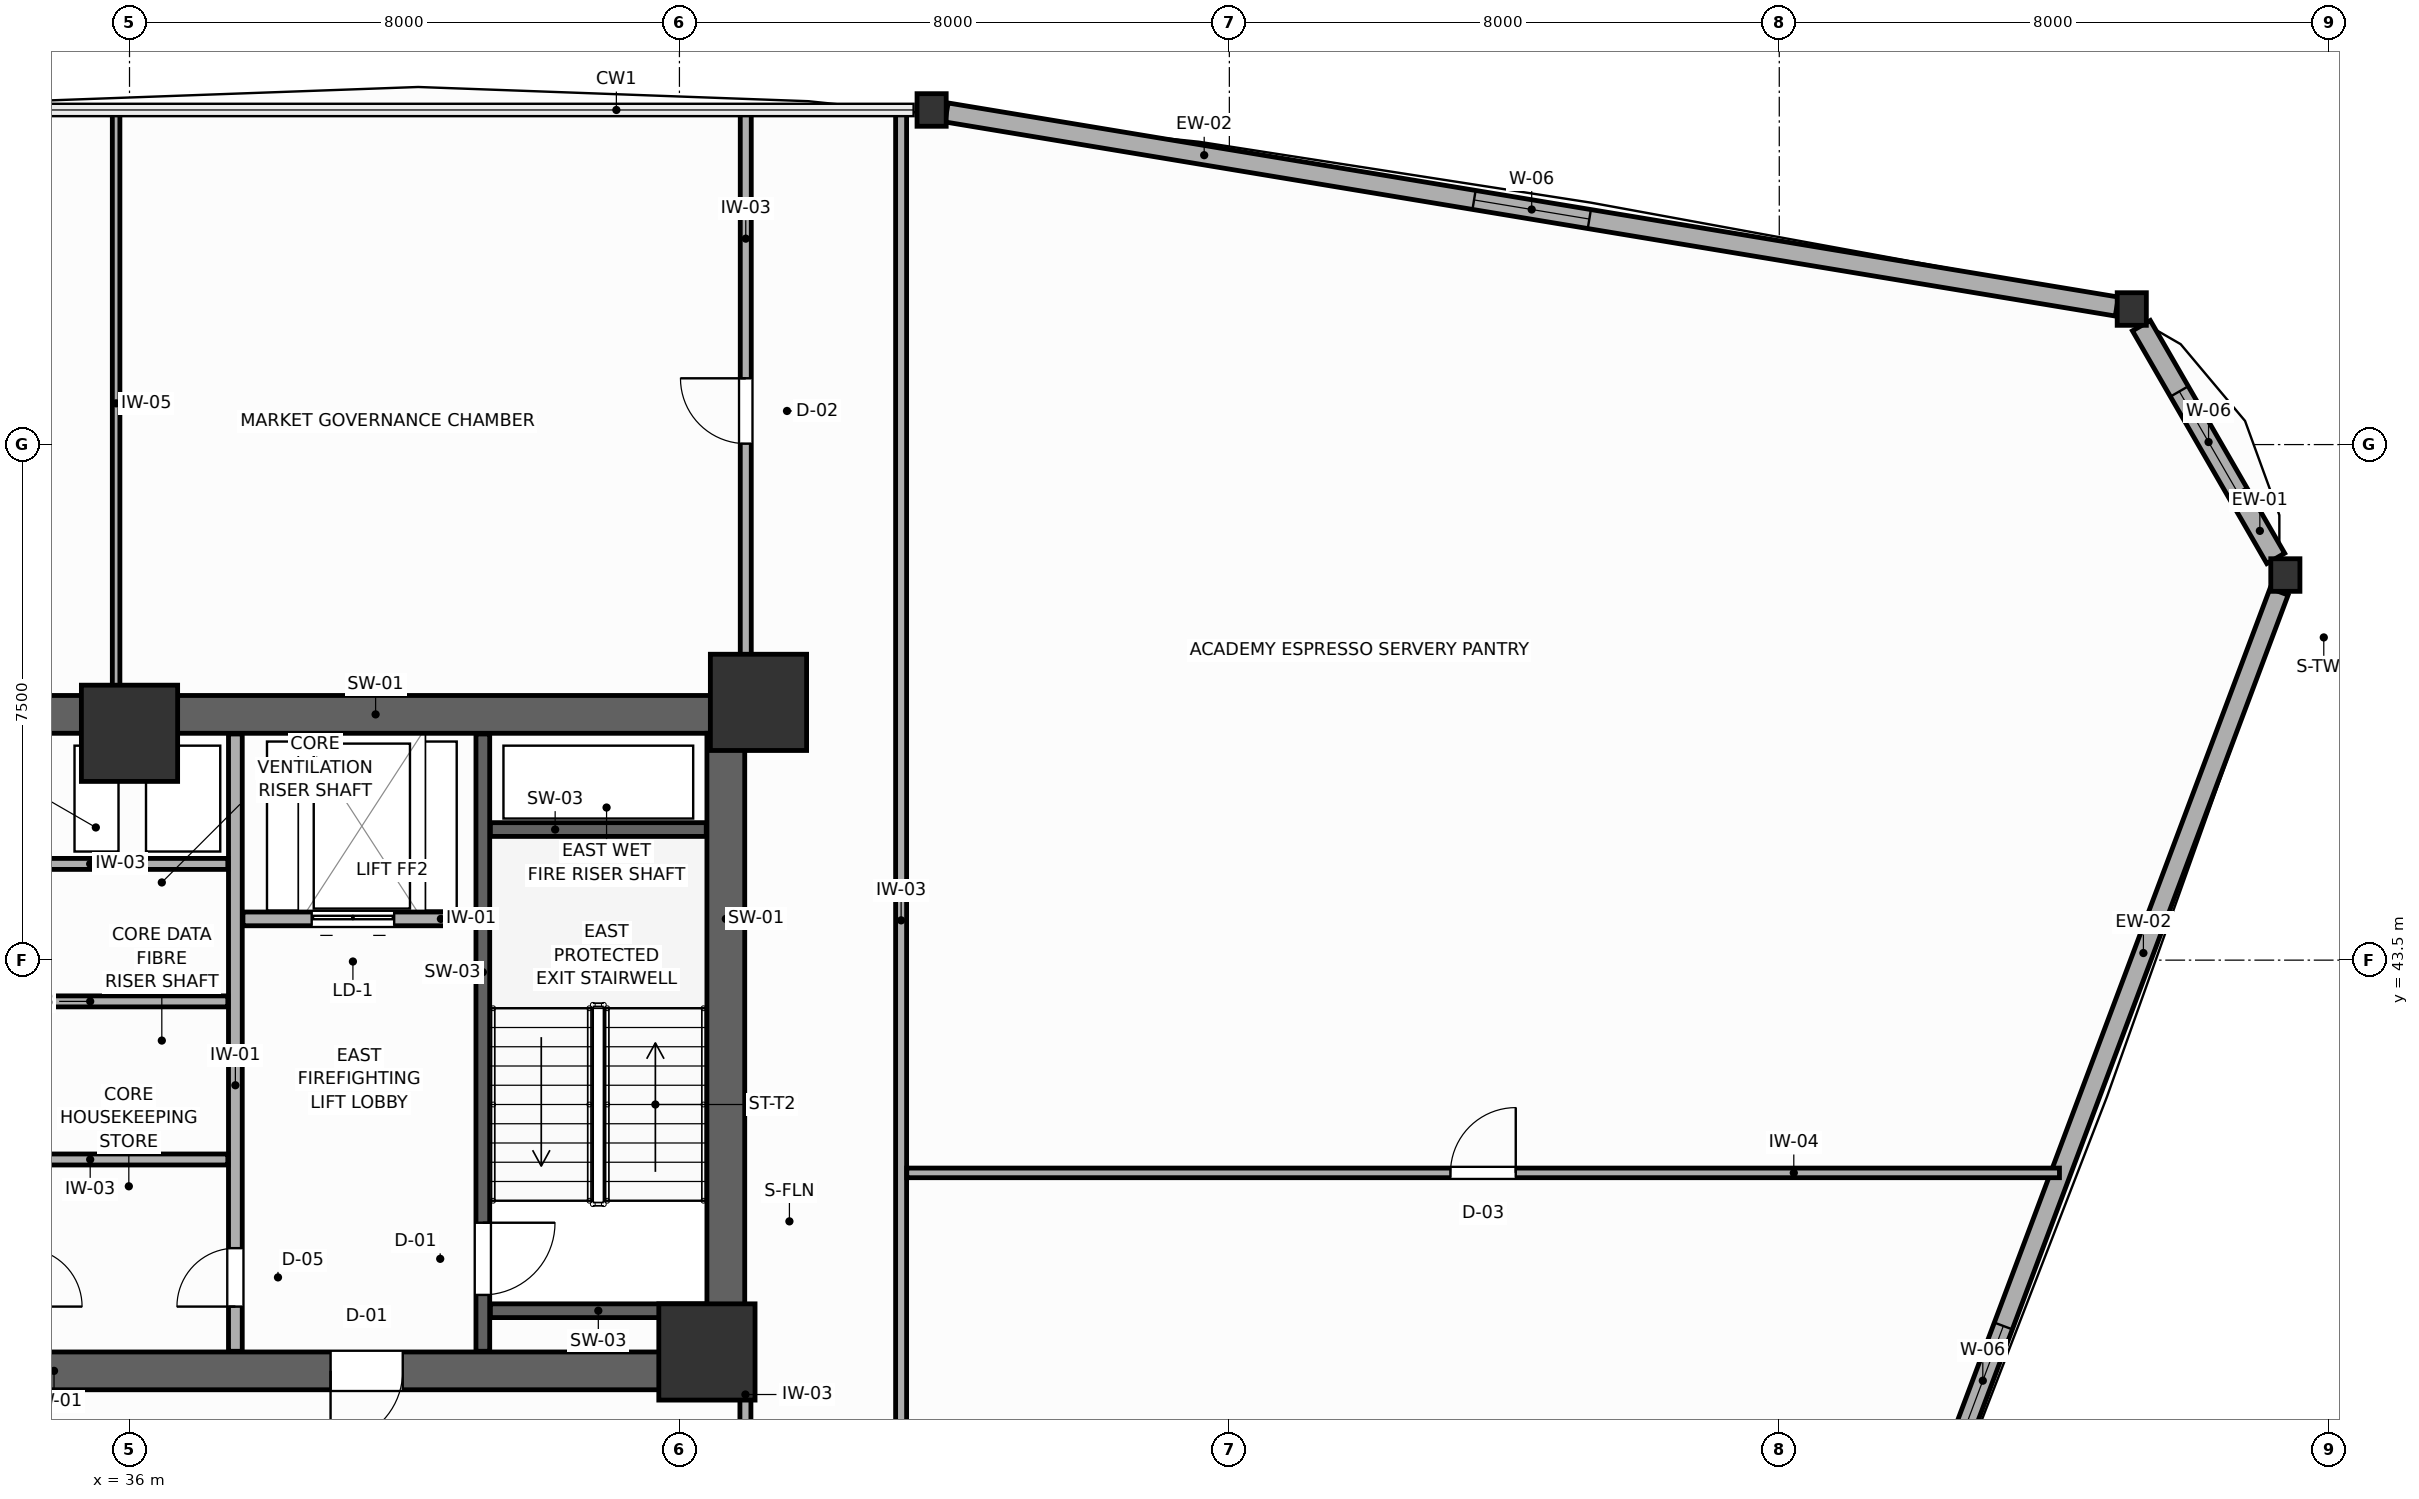
"""IFC4 building model, lengths in metres.
Left out: names, types, materials, properties, quantities, classifications, styles, units other than length and angle.
Written with IfcOpenShell. Run it as: python <this file> out.ifc"""

import sys

from ifc_helpers import new_model, si_unit, direction, frame, frame_2d, origin, origin_2d, place, context, subcontext, project, spatial, rectangle, i_section, extrude, source, transform, mapped, element, fill, save


model = new_model("IFC4")
c1 = context("Model", 3, precision=1e-05, world=origin(), true_north=direction((0.0, 1.0)))
c2 = subcontext(c1, "Body", "Model", "MODEL_VIEW")
j1 = project(units=[si_unit("LENGTHUNIT", "METRE"), si_unit("PLANEANGLEUNIT", "RADIAN")], contexts=[c1])
p1 = place(None, origin())
s1 = spatial("IfcSite", under=j1, at=p1, CompositionType="ELEMENT")
p2 = place(p1, origin())
s2 = spatial("IfcBuilding", under=s1, at=p2, CompositionType="ELEMENT")
p3 = place(p2, frame((0.0, 0.0, 83.4)))
s3 = spatial("IfcBuildingStorey", under=s2, at=p3, CompositionType="ELEMENT", Elevation=83.4)
p4 = place(p3, frame((27.05, 47.075, 0.0), z_axis=(0.0, 0.0, 1.0), x_axis=(1.0, 0.0, 0.0)))
e1 = element("IfcWall", 1, at=p4, inside=s3, PredefinedType="SHEAR", context=c2, shape_type="SweptSolid", body=[
    extrude(rectangle(XDim=17.9, YDim=0.55, at=frame_2d((8.95, 0.0))), origin(), (0.0, 0.0, 1.0), 3.9),
])
p5 = place(p3, frame((27.05, 37.525, 0.0), z_axis=(0.0, 0.0, 1.0), x_axis=(1.0, 0.0, 0.0)))
e2 = element("IfcWall", 2, at=p5, inside=s3, PredefinedType="SHEAR", context=c2, shape_type="SweptSolid", body=[
    extrude(rectangle(XDim=17.9, YDim=0.55, at=frame_2d((8.95, 0.0))), origin(), (0.0, 0.0, 1.0), 3.9),
])
p6 = place(p5, frame((4.975, 0.0, 0.0)))
e3 = element("IfcOpeningElement", 3, at=p6, cuts=e2, PredefinedType="OPENING", context=c2, shape_type="SweptSolid", body=[
    extrude(rectangle(XDim=1.05, YDim=2.1, at=frame_2d((0.525, 1.05))), frame((0.0, 0.285, 0.0), z_axis=(0.0, -1.0, 0.0), x_axis=(1.0, 0.0, 0.0)), (0.0, 0.0, 1.0), 0.57),
])
p7 = place(p5, frame((11.875, 0.0, 0.0)))
e4 = element("IfcOpeningElement", 4, at=p7, cuts=e2, PredefinedType="OPENING", context=c2, shape_type="SweptSolid", body=[
    extrude(rectangle(XDim=1.05, YDim=2.1, at=frame_2d((0.525, 1.05))), frame((0.0, 0.285, 0.0), z_axis=(0.0, -1.0, 0.0), x_axis=(1.0, 0.0, 0.0)), (0.0, 0.0, 1.0), 0.57),
])
p8 = place(p3, frame((44.675, 37.8, 0.0), z_axis=(0.0, 0.0, 1.0), x_axis=(0.0, 1.0, 0.0)))
e5 = element("IfcWall", 5, at=p8, inside=s3, PredefinedType="SHEAR", context=c2, shape_type="SweptSolid", body=[
    extrude(rectangle(XDim=9.0, YDim=0.55, at=frame_2d((4.5, 0.0))), origin(), (0.0, 0.0, 1.0), 3.9),
])
m1 = source(origin(), c2, "Body", "SweptSolid", [
    extrude(rectangle(XDim=1.4, YDim=1.4, at=origin_2d()), origin(), (0.0, 0.0, 1.0), 3.9),
])
for number, where, z_axis, x_axis in (
    (6, (45.15, 47.25, 0.0), (0.0, 0.0, 1.0), (1.0, 0.0, 0.0)),
    (7, (44.4, 37.8, 0.0), (0.0, 0.0, 1.0), (1.0, 0.0, 0.0)),
    (8, (36.0, 46.8, 0.0), (0.0, 0.0, 1.0), (1.0, 0.0, 0.0)),
):
    element("IfcColumn", number, at=place(p3, frame(where, z_axis=z_axis, x_axis=x_axis)), inside=s3, PredefinedType="COLUMN", context=c2, shape_type="MappedRepresentation", body=[
        mapped(m1, transform((0.0, 0.0, 0.0), scale=1.0)),
    ])
m2 = source(origin(), c2, "Body", "SweptSolid", [
    extrude(i_section(OverallWidth=0.424, OverallDepth=0.474, WebThickness=0.045, FlangeThickness=0.072, FilletRadius=0.015, at=origin_2d()), origin(), (0.0, 0.0, 1.0), 3.9),
])
for number, where, z_axis, x_axis in (
    (9, (67.362, 49.102, 0.0), (0.0, 0.0, 1.0), (1.0, 0.0, 0.0)),
    (10, (65.128, 52.972, 0.0), (0.0, 0.0, 1.0), (1.0, 0.0, 0.0)),
    (11, (47.669, 55.868, 0.0), (0.0, 0.0, 1.0), (1.0, 0.0, 0.0)),
):
    element("IfcColumn", number, at=place(p3, frame(where, z_axis=z_axis, x_axis=x_axis)), inside=s3, PredefinedType="COLUMN", context=c2, shape_type="MappedRepresentation", body=[
        mapped(m2, transform((0.0, 0.0, 0.0), scale=1.0)),
    ])
p9 = place(p3, frame((67.222, 49.344, 0.0), z_axis=(0.0, 0.0, 1.0), x_axis=(-0.500014353419, 0.866017116675, 0.0)))
e12 = element("IfcWall", 12, at=p9, inside=s3, PredefinedType="SOLIDWALL", context=c2, shape_type="SweptSolid", body=[
    extrude(rectangle(XDim=3.91, YDim=0.3, at=frame_2d((1.955, 0.0))), origin(), (0.0, 0.0, 1.0), 2.08),
])
p10 = place(p9, frame((1.105, 0.0, 0.75)))
e13 = element("IfcOpeningElement", 13, at=p10, cuts=e12, PredefinedType="OPENING", context=c2, shape_type="SweptSolid", body=[
    extrude(rectangle(XDim=1.7, YDim=1.15, at=frame_2d((0.85, 0.575))), frame((0.0, 0.16, 0.0), z_axis=(0.0, -1.0, 0.0), x_axis=(1.0, 0.0, 0.0)), (0.0, 0.0, 1.0), 0.32),
])
p11 = place(p3, frame((64.911, 53.008, 0.0), z_axis=(0.0, 0.0, 1.0), x_axis=(-0.986523232029, 0.163621247604, 0.0)))
e14 = element("IfcWall", 14, at=p11, inside=s3, PredefinedType="SOLIDWALL", context=c2, shape_type="SweptSolid", body=[
    extrude(rectangle(XDim=17.258, YDim=0.28, at=frame_2d((8.629, 0.0))), origin(), (0.0, 0.0, 1.0), 2.08),
])
p12 = place(p11, frame((7.779, 0.0, 0.75)))
e15 = element("IfcOpeningElement", 15, at=p12, cuts=e14, PredefinedType="OPENING", context=c2, shape_type="SweptSolid", body=[
    extrude(rectangle(XDim=1.7, YDim=1.15, at=frame_2d((0.85, 0.575))), frame((0.0, 0.15, 0.0), z_axis=(0.0, -1.0, 0.0), x_axis=(1.0, 0.0, 0.0)), (0.0, 0.0, 1.0), 0.3),
])
p13 = place(p3, frame((61.231, 32.776, 0.0), z_axis=(0.0, 0.0, 1.0), x_axis=(0.351559441404, 0.936165561832, 0.0)))
e16 = element("IfcWall", 16, at=p13, inside=s3, PredefinedType="SOLIDWALL", context=c2, shape_type="SweptSolid", body=[
    extrude(rectangle(XDim=17.181, YDim=0.28, at=frame_2d((8.59, 0.0))), origin(), (0.0, 0.0, 1.0), 2.08),
])
p14 = place(p13, frame((4.07, 0.0, 0.75)))
e17 = element("IfcOpeningElement", 17, at=p14, cuts=e16, PredefinedType="OPENING", context=c2, shape_type="SweptSolid", body=[
    extrude(rectangle(XDim=1.7, YDim=1.15, at=frame_2d((0.85, 0.575))), frame((0.0, 0.15, 0.0), z_axis=(0.0, -1.0, 0.0), x_axis=(1.0, 0.0, 0.0)), (0.0, 0.0, 1.0), 0.3),
])
p15 = place(p3, frame((41.14, 37.81, 0.0), z_axis=(0.0, 0.0, 1.0), x_axis=(0.0, 1.0, 0.0)))
e18 = element("IfcWall", 18, at=p15, inside=s3, PredefinedType="SHEAR", context=c2, shape_type="SweptSolid", body=[
    extrude(rectangle(XDim=8.98, YDim=0.2, at=frame_2d((4.49, 0.0))), origin(), (0.0, 0.0, 1.0), 3.9),
])
p16 = place(p15, frame((0.82, 0.0, 0.0)))
e19 = element("IfcOpeningElement", 19, at=p16, cuts=e18, PredefinedType="OPENING", context=c2, shape_type="SweptSolid", body=[
    extrude(rectangle(XDim=1.05, YDim=2.1, at=frame_2d((0.525, 1.05))), frame((0.0, 0.11, 0.0), z_axis=(0.0, -1.0, 0.0), x_axis=(1.0, 0.0, 0.0)), (0.0, 0.0, 1.0), 0.22),
])
for number, where, z_axis, x_axis in (
    (20, (41.25, 45.4, 0.0), (0.0, 0.0, 1.0), (1.0, 0.0, 0.0)),
    (21, (41.25, 38.4, 0.0), (0.0, 0.0, 1.0), (1.0, 0.0, 0.0)),
):
    element("IfcWall", number, at=place(p3, frame(where, z_axis=z_axis, x_axis=x_axis)), inside=s3, PredefinedType="SHEAR", context=c2, shape_type="SweptSolid", body=[
        extrude(rectangle(XDim=3.14, YDim=0.2, at=frame_2d((1.57, 0.0))), origin(), (0.0, 0.0, 1.0), 3.9),
    ])
p17 = place(p3, frame((37.65, 44.1, 0.0), z_axis=(0.0, 0.0, 1.0), x_axis=(1.0, 0.0, 0.0)))
e22 = element("IfcWall", 22, at=p17, inside=s3, PredefinedType="PARTITIONING", context=c2, shape_type="SweptSolid", body=[
    extrude(rectangle(XDim=3.38, YDim=0.2, at=frame_2d((1.69, 0.0))), origin(), (0.0, 0.0, 1.0), 3.68),
])
p18 = place(p17, frame((1.0, 0.0, 0.0)))
e23 = element("IfcOpeningElement", 23, at=p18, cuts=e22, PredefinedType="OPENING", context=c2, shape_type="SweptSolid", body=[
    extrude(rectangle(XDim=1.2, YDim=2.1, at=frame_2d((0.6, 1.05))), frame((0.0, 0.11, 0.0), z_axis=(0.0, -1.0, 0.0), x_axis=(1.0, 0.0, 0.0)), (0.0, 0.0, 1.0), 0.22),
])
p19 = place(p3, frame((37.54, 37.81, 0.0), z_axis=(0.0, 0.0, 1.0), x_axis=(0.0, 1.0, 0.0)))
e24 = element("IfcWall", 24, at=p19, inside=s3, PredefinedType="PARTITIONING", context=c2, shape_type="SweptSolid", body=[
    extrude(rectangle(XDim=8.98, YDim=0.2, at=frame_2d((4.49, 0.0))), origin(), (0.0, 0.0, 1.0), 3.68),
])
p20 = place(p19, frame((0.65, 0.0, 0.0)))
e25 = element("IfcOpeningElement", 25, at=p20, cuts=e24, PredefinedType="OPENING", context=c2, shape_type="SweptSolid", body=[
    extrude(rectangle(XDim=0.85, YDim=2.05, at=frame_2d((0.425, 1.025))), frame((0.0, 0.11, 0.0), z_axis=(0.0, -1.0, 0.0), x_axis=(1.0, 0.0, 0.0)), (0.0, 0.0, 1.0), 0.22),
])
for number, where, z_axis, x_axis in (
    (26, (34.57, 40.6, 0.0), (0.0, 0.0, 1.0), (1.0, 0.0, 0.0)),
    (27, (34.57, 42.9, 0.0), (0.0, 0.0, 1.0), (1.0, 0.0, 0.0)),
    (28, (34.57, 44.9, 0.0), (0.0, 0.0, 1.0), (1.0, 0.0, 0.0)),
):
    element("IfcWall", number, at=place(p3, frame(where, z_axis=z_axis, x_axis=x_axis)), inside=s3, PredefinedType="PARTITIONING", context=c2, shape_type="SweptSolid", body=[
        extrude(rectangle(XDim=2.86, YDim=0.16, at=frame_2d((1.43, 0.0))), origin(), (0.0, 0.0, 1.0), 3.68),
    ])
p21 = place(p3, frame((44.96, 35.0, 0.0), z_axis=(0.0, 0.0, 1.0), x_axis=(0.0, 1.0, 0.0)))
e29 = element("IfcWall", 29, at=p21, inside=s3, PredefinedType="PARTITIONING", context=c2, shape_type="SweptSolid", body=[
    extrude(rectangle(XDim=2.65, YDim=0.16, at=frame_2d((1.325, 0.0))), origin(), (0.0, 0.0, 1.0), 3.68),
])
p22 = place(p21, frame((0.75, 0.0, 0.0)))
e30 = element("IfcOpeningElement", 30, at=p22, cuts=e29, PredefinedType="OPENING", context=c2, shape_type="SweptSolid", body=[
    extrude(rectangle(XDim=1.05, YDim=2.1, at=frame_2d((0.525, 1.05))), frame((0.0, 0.09, 0.0), z_axis=(0.0, -1.0, 0.0), x_axis=(1.0, 0.0, 0.0)), (0.0, 0.0, 1.0), 0.18),
])
p23 = place(p3, frame((47.225, 32.31, 0.0), z_axis=(0.0, 0.0, 1.0), x_axis=(0.0, 1.0, 0.0)))
e31 = element("IfcWall", 31, at=p23, inside=s3, PredefinedType="PARTITIONING", context=c2, shape_type="SweptSolid", body=[
    extrude(rectangle(XDim=23.538, YDim=0.16, at=frame_2d((11.769, 0.0))), origin(), (0.0, 0.0, 1.0), 2.24),
])
p24 = place(p3, frame((44.965, 47.34, 0.0), z_axis=(0.0, 0.0, 1.0), x_axis=(0.0, 1.0, 0.0)))
e32 = element("IfcWall", 32, at=p24, inside=s3, PredefinedType="PARTITIONING", context=c2, shape_type="SweptSolid", body=[
    extrude(rectangle(XDim=8.508, YDim=0.16, at=frame_2d((4.254, 0.0))), origin(), (0.0, 0.0, 1.0), 2.24),
])
p25 = place(p24, frame((3.674, 0.0, 0.0)))
e33 = element("IfcOpeningElement", 33, at=p25, cuts=e32, PredefinedType="OPENING", context=c2, shape_type="SweptSolid", body=[
    extrude(rectangle(XDim=0.95, YDim=2.05, at=frame_2d((0.475, 1.025))), frame((0.0, 0.09, 0.0), z_axis=(0.0, -1.0, 0.0), x_axis=(1.0, 0.0, 0.0)), (0.0, 0.0, 1.0), 0.18),
])
p26 = place(p3, frame((47.307, 40.405, 0.0), z_axis=(0.0, 0.0, 1.0), x_axis=(1.0, 0.0, 0.0)))
e34 = element("IfcWall", 34, at=p26, inside=s3, PredefinedType="PARTITIONING", context=c2, shape_type="SweptSolid", body=[
    extrude(rectangle(XDim=16.769, YDim=0.14, at=frame_2d((8.385, 0.0))), origin(), (0.0, 0.0, 1.0), 3.68),
])
p27 = place(p26, frame((7.909, 0.0, 0.0)))
e35 = element("IfcOpeningElement", 35, at=p27, cuts=e34, PredefinedType="OPENING", context=c2, shape_type="SweptSolid", body=[
    extrude(rectangle(XDim=0.95, YDim=2.05, at=frame_2d((0.475, 1.025))), frame((0.0, 0.08, 0.0), z_axis=(0.0, -1.0, 0.0), x_axis=(1.0, 0.0, 0.0)), (0.0, 0.0, 1.0), 0.16),
])
p28 = place(p3, frame((35.805, 47.352, 0.0), z_axis=(0.0, 0.0, 1.0), x_axis=(0.0, 1.0, 0.0)))
e36 = element("IfcWall", 36, at=p28, inside=s3, PredefinedType="MOVABLE", context=c2, shape_type="SweptSolid", body=[
    extrude(rectangle(XDim=8.496, YDim=0.11, at=frame_2d((4.248, 0.0))), origin(), (0.0, 0.0, 1.0), 3.68),
])
p29 = place(p10, origin())
e37 = element("IfcWindow", 37, at=p29, inside=s3, PartitioningType="SINGLE_PANEL", PredefinedType="WINDOW", context=c2, shape_type="SweptSolid", body=[
    extrude(rectangle(XDim=1.7, YDim=1.15, at=frame_2d((0.85, 0.575))), frame((0.0, 0.03, 0.0), z_axis=(0.0, -1.0, 0.0), x_axis=(1.0, 0.0, 0.0)), (0.0, 0.0, 1.0), 0.06),
])
fill(e13, e37)
p30 = place(p12, origin())
e38 = element("IfcWindow", 38, at=p30, inside=s3, PartitioningType="SINGLE_PANEL", PredefinedType="WINDOW", context=c2, shape_type="SweptSolid", body=[
    extrude(rectangle(XDim=1.7, YDim=1.15, at=frame_2d((0.85, 0.575))), frame((0.0, 0.03, 0.0), z_axis=(0.0, -1.0, 0.0), x_axis=(1.0, 0.0, 0.0)), (0.0, 0.0, 1.0), 0.06),
])
fill(e15, e38)
p31 = place(p14, origin())
e39 = element("IfcWindow", 39, at=p31, inside=s3, PartitioningType="SINGLE_PANEL", PredefinedType="WINDOW", context=c2, shape_type="SweptSolid", body=[
    extrude(rectangle(XDim=1.7, YDim=1.15, at=frame_2d((0.85, 0.575))), frame((0.0, 0.03, 0.0), z_axis=(0.0, -1.0, 0.0), x_axis=(1.0, 0.0, 0.0)), (0.0, 0.0, 1.0), 0.06),
])
fill(e17, e39)
p32 = place(p16, frame((1.05, 0.0, 0.0), z_axis=(0.0, 0.0, 1.0), x_axis=(-1.0, 0.0, 0.0)))
e40 = element("IfcDoor", 40, at=p32, inside=s3, OperationType="SINGLE_SWING_LEFT", PredefinedType="DOOR", context=c2, shape_type="SweptSolid", body=[
    extrude(rectangle(XDim=1.05, YDim=2.1, at=frame_2d((0.525, 1.05))), frame((0.0, 0.025, 0.0), z_axis=(0.0, -1.0, 0.0), x_axis=(1.0, 0.0, 0.0)), (0.0, 0.0, 1.0), 0.05),
])
fill(e19, e40)
p33 = place(p18, origin())
e41 = element("IfcDoor", 41, at=p33, inside=s3, OperationType="DOUBLE_DOOR_SLIDING", PredefinedType="DOOR", context=c2, shape_type="SweptSolid", body=[
    extrude(rectangle(XDim=1.2, YDim=2.1, at=frame_2d((0.6, 1.05))), frame((0.0, 0.025, 0.0), z_axis=(0.0, -1.0, 0.0), x_axis=(1.0, 0.0, 0.0)), (0.0, 0.0, 1.0), 0.05),
])
fill(e23, e41)
p34 = place(p20, origin())
e42 = element("IfcDoor", 42, at=p34, inside=s3, OperationType="SINGLE_SWING_LEFT", PredefinedType="DOOR", context=c2, shape_type="SweptSolid", body=[
    extrude(rectangle(XDim=0.85, YDim=2.05, at=frame_2d((0.425, 1.025))), frame((0.0, 0.025, 0.0), z_axis=(0.0, -1.0, 0.0), x_axis=(1.0, 0.0, 0.0)), (0.0, 0.0, 1.0), 0.05),
])
fill(e25, e42)
p35 = place(p25, origin())
e43 = element("IfcDoor", 43, at=p35, inside=s3, OperationType="SINGLE_SWING_RIGHT", PredefinedType="DOOR", context=c2, shape_type="SweptSolid", body=[
    extrude(rectangle(XDim=0.95, YDim=2.05, at=frame_2d((0.475, 1.025))), frame((0.0, 0.025, 0.0), z_axis=(0.0, -1.0, 0.0), x_axis=(1.0, 0.0, 0.0)), (0.0, 0.0, 1.0), 0.05),
])
fill(e33, e43)
p36 = place(p27, origin())
e44 = element("IfcDoor", 44, at=p36, inside=s3, OperationType="SINGLE_SWING_RIGHT", PredefinedType="DOOR", context=c2, shape_type="SweptSolid", body=[
    extrude(rectangle(XDim=0.95, YDim=2.05, at=frame_2d((0.475, 1.025))), frame((0.0, 0.025, 0.0), z_axis=(0.0, -1.0, 0.0), x_axis=(1.0, 0.0, 0.0)), (0.0, 0.0, 1.0), 0.05),
])
fill(e35, e44)
p37 = place(p7, frame((1.05, 0.0, 0.0), z_axis=(0.0, 0.0, 1.0), x_axis=(-1.0, 0.0, 0.0)))
e45 = element("IfcDoor", 45, at=p37, inside=s3, OperationType="SINGLE_SWING_RIGHT", PredefinedType="DOOR", context=c2, shape_type="SweptSolid", body=[
    extrude(rectangle(XDim=1.05, YDim=2.1, at=frame_2d((0.525, 1.05))), frame((0.0, 0.025, 0.0), z_axis=(0.0, -1.0, 0.0), x_axis=(1.0, 0.0, 0.0)), (0.0, 0.0, 1.0), 0.05),
])
fill(e4, e45)
save(model, sys.argv[1])
